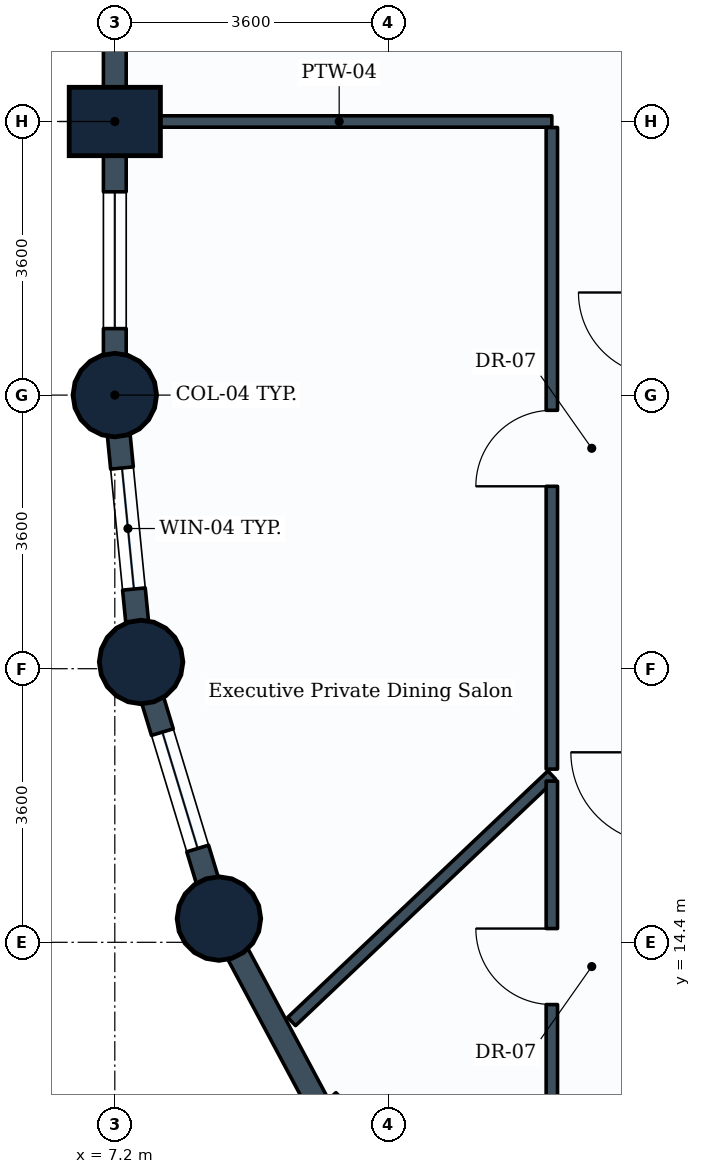
"""IFC4 building model, lengths in metres.
Left out: names, types, materials, properties, quantities, classifications, styles, units other than length and angle.
Written with IfcOpenShell. Run it as: python <this file> out.ifc"""

import sys

from ifc_helpers import new_model, si_unit, direction, frame, frame_2d, origin, origin_2d, place, context, subcontext, project, spatial, rectangle, circle, extrude, element, fill, save


model = new_model("IFC4")
c1 = context("Model", 3, precision=1e-05, world=origin(), true_north=direction((0.0, 1.0)))
c2 = subcontext(c1, "Body", "Model", "MODEL_VIEW")
j1 = project(units=[si_unit("LENGTHUNIT", "METRE"), si_unit("PLANEANGLEUNIT", "RADIAN")], contexts=[c1])
p1 = place(None, origin())
s1 = spatial("IfcSite", under=j1, at=p1, CompositionType="ELEMENT")
p2 = place(p1, origin())
s2 = spatial("IfcBuilding", under=s1, at=p2, CompositionType="ELEMENT")
p3 = place(p2, frame((0.0, 0.0, 70.8)))
s3 = spatial("IfcBuildingStorey", under=s2, at=p3, CompositionType="ELEMENT", Elevation=70.8)
p4 = place(p3, frame((7.2, 21.6, 0.0), z_axis=(0.0, 0.0, 1.0), x_axis=(1.0, 0.0, 0.0)))
e1 = element("IfcColumn", 1, at=p4, inside=s3, PredefinedType="COLUMN", context=c2, shape_type="SweptSolid", body=[
    extrude(circle(Radius=0.55, at=origin_2d()), origin(), (0.0, 0.0, 1.0), 3.9),
])
p5 = place(p3, frame((7.2, 25.2, 0.0), z_axis=(0.0, 0.0, 1.0), x_axis=(0.0, 1.0, 0.0)))
e2 = element("IfcColumn", 2, at=p5, inside=s3, PredefinedType="COLUMN", context=c2, shape_type="SweptSolid", body=[
    extrude(rectangle(XDim=0.9, YDim=1.2, at=origin_2d()), origin(), (0.0, 0.0, 1.0), 3.9),
])
for number, where, z_axis, x_axis in (
    (3, (7.546, 18.088, 0.0), (0.0, 0.0, 1.0), (1.0, 0.0, 0.0)),
    (4, (8.57, 14.712, 0.0), (0.0, 0.0, 1.0), (1.0, 0.0, 0.0)),
):
    element("IfcColumn", number, at=place(p3, frame(where, z_axis=z_axis, x_axis=x_axis)), inside=s3, PredefinedType="COLUMN", context=c2, shape_type="SweptSolid", body=[
        extrude(circle(Radius=0.55, at=origin_2d()), origin(), (0.0, 0.0, 1.0), 3.9),
    ])
p6 = place(p3, frame((7.2, 25.2, 0.0), z_axis=(0.0, 0.0, 1.0), x_axis=(0.0, 1.0, 0.0)))
e5 = element("IfcWall", 5, at=p6, inside=s3, PredefinedType="STANDARD", context=c2, shape_type="SweptSolid", body=[
    extrude(rectangle(XDim=3.6, YDim=0.3, at=frame_2d((1.8, 0.0))), origin(), (0.0, 0.0, 1.0), 2.93),
])
p7 = place(p3, frame((7.2, 21.6, 0.0), z_axis=(0.0, 0.0, 1.0), x_axis=(0.0, 1.0, 0.0)))
e6 = element("IfcWall", 6, at=p7, inside=s3, PredefinedType="STANDARD", context=c2, shape_type="SweptSolid", body=[
    extrude(rectangle(XDim=3.6, YDim=0.3, at=frame_2d((1.8, 0.0))), origin(), (0.0, 0.0, 1.0), 2.93),
])
p8 = place(p7, frame((0.875, 0.0, 0.85)))
e7 = element("IfcOpeningElement", 7, at=p8, cuts=e6, PredefinedType="OPENING", context=c2, shape_type="SweptSolid", body=[
    extrude(rectangle(XDim=1.8, YDim=1.35, at=frame_2d((0.9, 0.675))), frame((0.0, 0.16, 0.0), z_axis=(0.0, -1.0, 0.0), x_axis=(1.0, 0.0, 0.0)), (0.0, 0.0, 1.0), 0.32),
])
p9 = place(p3, frame((7.546, 18.088, 0.0), z_axis=(0.0, 0.0, 1.0), x_axis=(-0.09802417461, 0.995184033831, 0.0)))
e8 = element("IfcWall", 8, at=p9, inside=s3, PredefinedType="STANDARD", context=c2, shape_type="SweptSolid", body=[
    extrude(rectangle(XDim=3.529, YDim=0.3, at=frame_2d((1.765, 0.0))), origin(), (0.0, 0.0, 1.0), 2.93),
])
p10 = place(p9, frame((0.965, 0.0, 0.85)))
e9 = element("IfcOpeningElement", 9, at=p10, cuts=e8, PredefinedType="OPENING", context=c2, shape_type="SweptSolid", body=[
    extrude(rectangle(XDim=1.6, YDim=1.35, at=frame_2d((0.8, 0.675))), frame((0.0, 0.16, 0.0), z_axis=(0.0, -1.0, 0.0), x_axis=(1.0, 0.0, 0.0)), (0.0, 0.0, 1.0), 0.32),
])
p11 = place(p3, frame((8.57, 14.712, 0.0), z_axis=(0.0, 0.0, 1.0), x_axis=(-0.290305086481, 0.956934144423, 0.0)))
e10 = element("IfcWall", 10, at=p11, inside=s3, PredefinedType="STANDARD", context=c2, shape_type="SweptSolid", body=[
    extrude(rectangle(XDim=3.528, YDim=0.3, at=frame_2d((1.764, 0.0))), origin(), (0.0, 0.0, 1.0), 2.93),
])
p12 = place(p11, frame((0.964, 0.0, 0.85)))
e11 = element("IfcOpeningElement", 11, at=p12, cuts=e10, PredefinedType="OPENING", context=c2, shape_type="SweptSolid", body=[
    extrude(rectangle(XDim=1.6, YDim=1.35, at=frame_2d((0.8, 0.675))), frame((0.0, 0.16, 0.0), z_axis=(0.0, -1.0, 0.0), x_axis=(1.0, 0.0, 0.0)), (0.0, 0.0, 1.0), 0.32),
])
p13 = place(p3, frame((10.234, 11.6, 0.0), z_axis=(0.0, 0.0, 1.0), x_axis=(-0.47151087309, 0.881860247748, 0.0)))
e12 = element("IfcWall", 12, at=p13, inside=s3, PredefinedType="STANDARD", context=c2, shape_type="SweptSolid", body=[
    extrude(rectangle(XDim=3.529, YDim=0.3, at=frame_2d((1.764, 0.0))), origin(), (0.0, 0.0, 1.0), 2.93),
])
p14 = place(p3, frame((7.354, 25.2, 0.0), z_axis=(0.0, 0.0, 1.0), x_axis=(1.0, 0.0, 0.0)))
e13 = element("IfcWall", 13, at=p14, inside=s3, PredefinedType="PARTITIONING", context=c2, shape_type="SweptSolid", body=[
    extrude(rectangle(XDim=5.596, YDim=0.15, at=frame_2d((2.798, 0.0))), origin(), (0.0, 0.0, 1.0), 3.565),
])
p15 = place(p3, frame((12.95, 9.35, 0.0), z_axis=(0.0, 0.0, 1.0), x_axis=(-0.692039701287, 0.721859440503, 0.0)))
e14 = element("IfcWall", 14, at=p15, inside=s3, PredefinedType="PARTITIONING", context=c2, shape_type="SweptSolid", body=[
    extrude(rectangle(XDim=4.184, YDim=0.15, at=frame_2d((2.092, 0.0))), origin(), (0.0, 0.0, 1.0), 2.93),
])
p16 = place(p3, frame((12.95, 16.6, 0.0), z_axis=(0.0, 0.0, 1.0), x_axis=(-0.726056084079, -0.687635486847, 0.0)))
e15 = element("IfcWall", 15, at=p16, inside=s3, PredefinedType="PARTITIONING", context=c2, shape_type="SweptSolid", body=[
    extrude(rectangle(XDim=4.715, YDim=0.15, at=frame_2d((2.357, 0.0))), origin(), (0.0, 0.0, 1.0), 2.93),
])
p17 = place(p3, frame((12.95, 16.679, 0.0), z_axis=(0.0, 0.0, 1.0), x_axis=(0.0, 1.0, 0.0)))
e16 = element("IfcWall", 16, at=p17, inside=s3, PredefinedType="PARTITIONING", context=c2, shape_type="SweptSolid", body=[
    extrude(rectangle(XDim=8.442, YDim=0.15, at=frame_2d((4.221, 0.0))), origin(), (0.0, 0.0, 1.0), 3.01),
])
p18 = place(p17, frame((3.721, 0.0, 0.0)))
e17 = element("IfcOpeningElement", 17, at=p18, cuts=e16, PredefinedType="OPENING", context=c2, shape_type="SweptSolid", body=[
    extrude(rectangle(XDim=1.0, YDim=2.1, at=frame_2d((0.5, 1.05))), frame((0.0, 0.085, 0.0), z_axis=(0.0, -1.0, 0.0), x_axis=(1.0, 0.0, 0.0)), (0.0, 0.0, 1.0), 0.17),
])
p19 = place(p3, frame((12.95, 9.538, 0.0), z_axis=(0.0, 0.0, 1.0), x_axis=(0.0, 1.0, 0.0)))
e18 = element("IfcWall", 18, at=p19, inside=s3, PredefinedType="PARTITIONING", context=c2, shape_type="SweptSolid", body=[
    extrude(rectangle(XDim=6.983, YDim=0.15, at=frame_2d((3.492, 0.0))), origin(), (0.0, 0.0, 1.0), 2.97),
])
p20 = place(p19, frame((4.043, 0.0, 0.0)))
e19 = element("IfcOpeningElement", 19, at=p20, cuts=e18, PredefinedType="OPENING", context=c2, shape_type="SweptSolid", body=[
    extrude(rectangle(XDim=1.0, YDim=2.1, at=frame_2d((0.5, 1.05))), frame((0.0, 0.085, 0.0), z_axis=(0.0, -1.0, 0.0), x_axis=(1.0, 0.0, 0.0)), (0.0, 0.0, 1.0), 0.17),
])
p21 = place(p8, origin())
e20 = element("IfcWindow", 20, at=p21, inside=s3, PartitioningType="SINGLE_PANEL", PredefinedType="WINDOW", context=c2, shape_type="SweptSolid", body=[
    extrude(rectangle(XDim=1.8, YDim=1.35, at=frame_2d((0.9, 0.675))), frame((0.0, 0.03, 0.0), z_axis=(0.0, -1.0, 0.0), x_axis=(1.0, 0.0, 0.0)), (0.0, 0.0, 1.0), 0.06),
])
fill(e7, e20)
p22 = place(p10, origin())
e21 = element("IfcWindow", 21, at=p22, inside=s3, PartitioningType="SINGLE_PANEL", PredefinedType="WINDOW", context=c2, shape_type="SweptSolid", body=[
    extrude(rectangle(XDim=1.6, YDim=1.35, at=frame_2d((0.8, 0.675))), frame((0.0, 0.03, 0.0), z_axis=(0.0, -1.0, 0.0), x_axis=(1.0, 0.0, 0.0)), (0.0, 0.0, 1.0), 0.06),
])
fill(e9, e21)
p23 = place(p12, origin())
e22 = element("IfcWindow", 22, at=p23, inside=s3, PartitioningType="SINGLE_PANEL", PredefinedType="WINDOW", context=c2, shape_type="SweptSolid", body=[
    extrude(rectangle(XDim=1.6, YDim=1.35, at=frame_2d((0.8, 0.675))), frame((0.0, 0.03, 0.0), z_axis=(0.0, -1.0, 0.0), x_axis=(1.0, 0.0, 0.0)), (0.0, 0.0, 1.0), 0.06),
])
fill(e11, e22)
p24 = place(p18, origin())
e23 = element("IfcDoor", 23, at=p24, inside=s3, OperationType="SINGLE_SWING_LEFT", PredefinedType="DOOR", context=c2, shape_type="SweptSolid", body=[
    extrude(rectangle(XDim=1.0, YDim=2.1, at=frame_2d((0.5, 1.05))), frame((0.0, 0.025, 0.0), z_axis=(0.0, -1.0, 0.0), x_axis=(1.0, 0.0, 0.0)), (0.0, 0.0, 1.0), 0.05),
])
fill(e17, e23)
p25 = place(p20, origin())
e24 = element("IfcDoor", 24, at=p25, inside=s3, OperationType="SINGLE_SWING_RIGHT", PredefinedType="DOOR", context=c2, shape_type="SweptSolid", body=[
    extrude(rectangle(XDim=1.0, YDim=2.1, at=frame_2d((0.5, 1.05))), frame((0.0, 0.025, 0.0), z_axis=(0.0, -1.0, 0.0), x_axis=(1.0, 0.0, 0.0)), (0.0, 0.0, 1.0), 0.05),
])
fill(e19, e24)
save(model, sys.argv[1])
